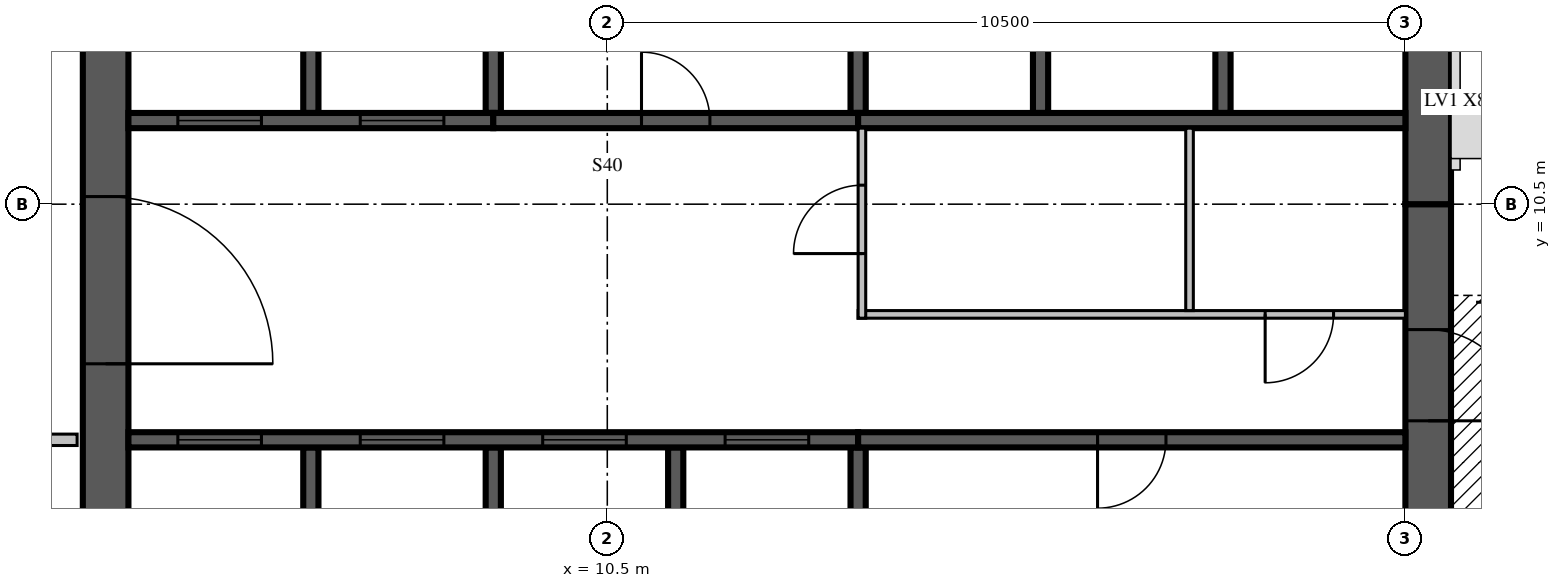
"""IFC4 building model, lengths in metres.
Left out: names, types, materials, properties, quantities, classifications, styles, units other than length and angle.
Written with IfcOpenShell. Run it as: python <this file> out.ifc"""

import sys

from ifc_helpers import new_model, si_unit, direction, frame, frame_2d, origin, place, context, subcontext, project, spatial, rectangle, extrude, source, transform, mapped, element, fill, save


model = new_model("IFC4")
c1 = context("Model", 3, precision=1e-05, world=origin(), true_north=direction((0.0, 1.0)))
c2 = subcontext(c1, "Body", "Model", "MODEL_VIEW")
j1 = project(units=[si_unit("LENGTHUNIT", "METRE"), si_unit("PLANEANGLEUNIT", "RADIAN")], contexts=[c1])
p1 = place(None, origin())
s1 = spatial("IfcSite", under=j1, at=p1, CompositionType="ELEMENT")
p2 = place(p1, origin())
s2 = spatial("IfcBuilding", under=s1, at=p2, CompositionType="ELEMENT")
p3 = place(p2, frame((0.0, 0.0, 305.5)))
s3 = spatial("IfcBuildingStorey", under=s2, at=p3, CompositionType="ELEMENT", Elevation=305.5)
m1 = source(origin(), c2, "Body", "SweptSolid", [
    extrude(rectangle(XDim=17.4, YDim=0.6, at=frame_2d((8.7, 0.0))), origin(), (0.0, 0.0, 1.0), 3.5),
])
p4 = place(p3, frame((3.9, 4.2, 0.0), z_axis=(0.0, 0.0, 1.0), x_axis=(0.0, 1.0, 0.0)))
e1 = element("IfcWall", 1, at=p4, inside=s3, PredefinedType="SHEAR", context=c2, shape_type="MappedRepresentation", body=[
    mapped(m1, transform((0.0, 0.0, 0.0), scale=1.0)),
])
m2 = source(origin(), c2, "Body", "SweptSolid", [
    extrude(rectangle(XDim=2.2, YDim=2.1, at=frame_2d((1.1, 1.05))), frame((0.0, 0.31, 0.0), z_axis=(0.0, -1.0, 0.0), x_axis=(1.0, 0.0, 0.0)), (0.0, 0.0, 1.0), 0.62),
])
p5 = place(p4, frame((4.2, 0.0, 0.0)))
e2 = element("IfcOpeningElement", 2, at=p5, cuts=e1, PredefinedType="OPENING", context=c2, shape_type="MappedRepresentation", body=[
    mapped(m2, transform((0.0, 0.0, 0.0), scale=1.0)),
])
m3 = source(origin(), c2, "Body", "SweptSolid", [
    extrude(rectangle(XDim=0.9, YDim=2.1, at=frame_2d((0.45, 1.05))), frame((0.0, 0.31, 0.0), z_axis=(0.0, -1.0, 0.0), x_axis=(1.0, 0.0, 0.0)), (0.0, 0.0, 1.0), 0.62),
])
p6 = place(p4, frame((10.95, 0.0, 0.0)))
e3 = element("IfcOpeningElement", 3, at=p6, cuts=e1, PredefinedType="OPENING", context=c2, shape_type="MappedRepresentation", body=[
    mapped(m3, transform((0.0, 0.0, 0.0), scale=1.0)),
])
m4 = source(origin(), c2, "Body", "SweptSolid", [
    extrude(rectangle(XDim=6.3, YDim=0.6, at=frame_2d((3.15, 0.0))), origin(), (0.0, 0.0, 1.0), 3.5),
])
p7 = place(p3, frame((21.3, 4.2, 0.0), z_axis=(0.0, 0.0, 1.0), x_axis=(0.0, 1.0, 0.0)))
e4 = element("IfcWall", 4, at=p7, inside=s3, PredefinedType="SHEAR", context=c2, shape_type="MappedRepresentation", body=[
    mapped(m4, transform((0.0, 0.0, 0.0), scale=1.0)),
])
m5 = source(origin(), c2, "Body", "SweptSolid", [
    extrude(rectangle(XDim=1.2, YDim=2.1, at=frame_2d((0.6, 1.05))), frame((0.0, 0.31, 0.0), z_axis=(0.0, -1.0, 0.0), x_axis=(1.0, 0.0, 0.0)), (0.0, 0.0, 1.0), 0.62),
])
p8 = place(p7, frame((3.45, 0.0, 0.0)))
e5 = element("IfcOpeningElement", 5, at=p8, cuts=e4, PredefinedType="OPENING", context=c2, shape_type="MappedRepresentation", body=[
    mapped(m5, transform((0.0, 0.0, 0.0), scale=1.0)),
])
m6 = source(origin(), c2, "Body", "SweptSolid", [
    extrude(rectangle(XDim=10.5, YDim=0.6, at=frame_2d((5.25, 0.0))), origin(), (0.0, 0.0, 1.0), 3.5),
])
p9 = place(p3, frame((21.3, 10.5, 0.0), z_axis=(0.0, 0.0, 1.0), x_axis=(0.0, 1.0, 0.0)))
e6 = element("IfcWall", 6, at=p9, inside=s3, PredefinedType="SHEAR", context=c2, shape_type="MappedRepresentation", body=[
    mapped(m6, transform((0.0, 0.0, 0.0), scale=1.0)),
])
m7 = source(origin(), c2, "Body", "SweptSolid", [
    extrude(rectangle(XDim=1.2, YDim=2.4, at=frame_2d((0.6, 1.2))), frame((0.0, 0.31, 0.0), z_axis=(0.0, -1.0, 0.0), x_axis=(1.0, 0.0, 0.0)), (0.0, 0.0, 1.0), 0.62),
])
p10 = place(p9, frame((5.7, 0.0, 0.6)))
e7 = element("IfcOpeningElement", 7, at=p10, cuts=e6, PredefinedType="OPENING", context=c2, shape_type="MappedRepresentation", body=[
    mapped(m7, transform((0.0, 0.0, 0.0), scale=1.0)),
])
m8 = source(origin(), c2, "Body", "SweptSolid", [
    extrude(rectangle(XDim=3.1, YDim=0.2, at=frame_2d((1.55, 0.0))), origin(), (0.0, 0.0, 1.0), 3.5),
])
for number, where, z_axis, x_axis in (
    (8, (6.6, 4.2, 0.0), (0.0, 0.0, 1.0), (0.0, 1.0, 0.0)),
    (9, (9.0, 4.2, 0.0), (0.0, 0.0, 1.0), (0.0, 1.0, 0.0)),
    (10, (11.4, 4.2, 0.0), (0.0, 0.0, 1.0), (0.0, 1.0, 0.0)),
):
    element("IfcWall", number, at=place(p3, frame(where, z_axis=z_axis, x_axis=x_axis)), inside=s3, PredefinedType="SOLIDWALL", context=c2, shape_type="MappedRepresentation", body=[
        mapped(m8, transform((0.0, 0.0, 0.0), scale=1.0)),
    ])
m9 = source(origin(), c2, "Body", "SweptSolid", [
    extrude(rectangle(XDim=3.1, YDim=0.2, at=frame_2d((1.55, 0.0))), origin(), (0.0, 0.0, 1.0), 3.1),
])
p11 = place(p3, frame((13.8, 4.2, 0.0), z_axis=(0.0, 0.0, 1.0), x_axis=(0.0, 1.0, 0.0)))
e11 = element("IfcWall", 11, at=p11, inside=s3, PredefinedType="SOLIDWALL", context=c2, shape_type="MappedRepresentation", body=[
    mapped(m9, transform((0.0, 0.0, 0.0), scale=1.0)),
])
m10 = source(origin(), c2, "Body", "SweptSolid", [
    extrude(rectangle(XDim=3.0, YDim=0.2, at=frame_2d((1.5, 0.0))), origin(), (0.0, 0.0, 1.0), 3.5),
])
p12 = place(p3, frame((6.6, 11.7, 0.0), z_axis=(0.0, 0.0, 1.0), x_axis=(0.0, 1.0, 0.0)))
e12 = element("IfcWall", 12, at=p12, inside=s3, PredefinedType="SOLIDWALL", context=c2, shape_type="MappedRepresentation", body=[
    mapped(m10, transform((0.0, 0.0, 0.0), scale=1.0)),
])
m11 = source(origin(), c2, "Body", "SweptSolid", [
    extrude(rectangle(XDim=3.0, YDim=0.2, at=frame_2d((1.5, 0.0))), origin(), (0.0, 0.0, 1.0), 3.1),
])
for number, where, z_axis, x_axis in (
    (13, (9.0, 11.7, 0.0), (0.0, 0.0, 1.0), (0.0, 1.0, 0.0)),
    (14, (13.8, 11.7, 0.0), (0.0, 0.0, 1.0), (0.0, 1.0, 0.0)),
):
    element("IfcWall", number, at=place(p3, frame(where, z_axis=z_axis, x_axis=x_axis)), inside=s3, PredefinedType="SOLIDWALL", context=c2, shape_type="MappedRepresentation", body=[
        mapped(m11, transform((0.0, 0.0, 0.0), scale=1.0)),
    ])
for number, where, z_axis, x_axis in (
    (15, (16.2, 11.7, 0.0), (0.0, 0.0, 1.0), (0.0, 1.0, 0.0)),
    (16, (18.6, 11.7, 0.0), (0.0, 0.0, 1.0), (0.0, 1.0, 0.0)),
):
    element("IfcWall", number, at=place(p3, frame(where, z_axis=z_axis, x_axis=x_axis)), inside=s3, PredefinedType="SOLIDWALL", context=c2, shape_type="MappedRepresentation", body=[
        mapped(m10, transform((0.0, 0.0, 0.0), scale=1.0)),
    ])
m12 = source(origin(), c2, "Body", "SweptSolid", [
    extrude(rectangle(XDim=9.6, YDim=0.2, at=frame_2d((4.8, 0.0))), origin(), (0.0, 0.0, 1.0), 3.5),
])
p13 = place(p3, frame((4.2, 7.4, 0.0), z_axis=(0.0, 0.0, 1.0), x_axis=(1.0, 0.0, 0.0)))
e17 = element("IfcWall", 17, at=p13, inside=s3, PredefinedType="SOLIDWALL", context=c2, shape_type="MappedRepresentation", body=[
    mapped(m12, transform((0.0, 0.0, 0.0), scale=1.0)),
])
m13 = source(origin(), c2, "Body", "SweptSolid", [
    extrude(rectangle(XDim=1.1, YDim=2.1, at=frame_2d((0.55, 1.05))), frame((0.0, 0.11, 0.0), z_axis=(0.0, -1.0, 0.0), x_axis=(1.0, 0.0, 0.0)), (0.0, 0.0, 1.0), 0.22),
])
p14 = place(p13, frame((0.65, 0.0, 0.0)))
e18 = element("IfcOpeningElement", 18, at=p14, cuts=e17, PredefinedType="OPENING", context=c2, shape_type="MappedRepresentation", body=[
    mapped(m13, transform((0.0, 0.0, 0.0), scale=1.0)),
])
p15 = place(p13, frame((3.05, 0.0, 0.0)))
e19 = element("IfcOpeningElement", 19, at=p15, cuts=e17, PredefinedType="OPENING", context=c2, shape_type="MappedRepresentation", body=[
    mapped(m13, transform((0.0, 0.0, 0.0), scale=1.0)),
])
p16 = place(p13, frame((5.45, 0.0, 0.0)))
e20 = element("IfcOpeningElement", 20, at=p16, cuts=e17, PredefinedType="OPENING", context=c2, shape_type="MappedRepresentation", body=[
    mapped(m13, transform((0.0, 0.0, 0.0), scale=1.0)),
])
p17 = place(p13, frame((7.85, 0.0, 0.0)))
e21 = element("IfcOpeningElement", 21, at=p17, cuts=e17, PredefinedType="OPENING", context=c2, shape_type="MappedRepresentation", body=[
    mapped(m13, transform((0.0, 0.0, 0.0), scale=1.0)),
])
m14 = source(origin(), c2, "Body", "SweptSolid", [
    extrude(rectangle(XDim=7.2, YDim=0.2, at=frame_2d((3.6, 0.0))), origin(), (0.0, 0.0, 1.0), 3.1),
])
p18 = place(p3, frame((13.8, 7.4, 0.0), z_axis=(0.0, 0.0, 1.0), x_axis=(1.0, 0.0, 0.0)))
e22 = element("IfcWall", 22, at=p18, inside=s3, PredefinedType="SOLIDWALL", context=c2, shape_type="MappedRepresentation", body=[
    mapped(m14, transform((0.0, 0.0, 0.0), scale=1.0)),
])
m15 = source(origin(), c2, "Body", "SweptSolid", [
    extrude(rectangle(XDim=0.9, YDim=2.1, at=frame_2d((0.45, 1.05))), frame((0.0, 0.11, 0.0), z_axis=(0.0, -1.0, 0.0), x_axis=(1.0, 0.0, 0.0)), (0.0, 0.0, 1.0), 0.22),
])
p19 = place(p18, frame((3.15, 0.0, 0.0)))
e23 = element("IfcOpeningElement", 23, at=p19, cuts=e22, PredefinedType="OPENING", context=c2, shape_type="MappedRepresentation", body=[
    mapped(m15, transform((0.0, 0.0, 0.0), scale=1.0)),
])
m16 = source(origin(), c2, "Body", "SweptSolid", [
    extrude(rectangle(XDim=4.8, YDim=0.2, at=frame_2d((2.4, 0.0))), origin(), (0.0, 0.0, 1.0), 3.5),
])
p20 = place(p3, frame((4.2, 11.6, 0.0), z_axis=(0.0, 0.0, 1.0), x_axis=(1.0, 0.0, 0.0)))
e24 = element("IfcWall", 24, at=p20, inside=s3, PredefinedType="SOLIDWALL", context=c2, shape_type="MappedRepresentation", body=[
    mapped(m16, transform((0.0, 0.0, 0.0), scale=1.0)),
])
p21 = place(p20, frame((0.65, 0.0, 0.0)))
e25 = element("IfcOpeningElement", 25, at=p21, cuts=e24, PredefinedType="OPENING", context=c2, shape_type="MappedRepresentation", body=[
    mapped(m13, transform((0.0, 0.0, 0.0), scale=1.0)),
])
p22 = place(p20, frame((3.05, 0.0, 0.0)))
e26 = element("IfcOpeningElement", 26, at=p22, cuts=e24, PredefinedType="OPENING", context=c2, shape_type="MappedRepresentation", body=[
    mapped(m13, transform((0.0, 0.0, 0.0), scale=1.0)),
])
m17 = source(origin(), c2, "Body", "SweptSolid", [
    extrude(rectangle(XDim=4.8, YDim=0.2, at=frame_2d((2.4, 0.0))), origin(), (0.0, 0.0, 1.0), 3.1),
])
p23 = place(p3, frame((9.0, 11.6, 0.0), z_axis=(0.0, 0.0, 1.0), x_axis=(1.0, 0.0, 0.0)))
e27 = element("IfcWall", 27, at=p23, inside=s3, PredefinedType="SOLIDWALL", context=c2, shape_type="MappedRepresentation", body=[
    mapped(m17, transform((0.0, 0.0, 0.0), scale=1.0)),
])
p24 = place(p23, frame((1.95, 0.0, 0.0)))
e28 = element("IfcOpeningElement", 28, at=p24, cuts=e27, PredefinedType="OPENING", context=c2, shape_type="MappedRepresentation", body=[
    mapped(m15, transform((0.0, 0.0, 0.0), scale=1.0)),
])
m18 = source(origin(), c2, "Body", "SweptSolid", [
    extrude(rectangle(XDim=7.2, YDim=0.2, at=frame_2d((3.6, 0.0))), origin(), (0.0, 0.0, 1.0), 3.5),
])
p25 = place(p3, frame((13.8, 11.6, 0.0), z_axis=(0.0, 0.0, 1.0), x_axis=(1.0, 0.0, 0.0)))
e29 = element("IfcWall", 29, at=p25, inside=s3, PredefinedType="SOLIDWALL", context=c2, shape_type="MappedRepresentation", body=[
    mapped(m18, transform((0.0, 0.0, 0.0), scale=1.0)),
])
m19 = source(origin(), c2, "Body", "SweptSolid", [
    extrude(rectangle(XDim=7.2, YDim=0.1, at=frame_2d((3.6, 0.0))), origin(), (0.0, 0.0, 1.0), 3.1),
])
p26 = place(p3, frame((13.8, 9.05, 0.0), z_axis=(0.0, 0.0, 1.0), x_axis=(1.0, 0.0, 0.0)))
e30 = element("IfcWall", 30, at=p26, inside=s3, PredefinedType="PARTITIONING", context=c2, shape_type="MappedRepresentation", body=[
    mapped(m19, transform((0.0, 0.0, 0.0), scale=1.0)),
])
m20 = source(origin(), c2, "Body", "SweptSolid", [
    extrude(rectangle(XDim=0.9, YDim=2.1, at=frame_2d((0.45, 1.05))), frame((0.0, 0.06, 0.0), z_axis=(0.0, -1.0, 0.0), x_axis=(1.0, 0.0, 0.0)), (0.0, 0.0, 1.0), 0.12),
])
p27 = place(p26, frame((5.355, 0.0, 0.0)))
e31 = element("IfcOpeningElement", 31, at=p27, cuts=e30, PredefinedType="OPENING", context=c2, shape_type="MappedRepresentation", body=[
    mapped(m20, transform((0.0, 0.0, 0.0), scale=1.0)),
])
m21 = source(origin(), c2, "Body", "SweptSolid", [
    extrude(rectangle(XDim=2.5, YDim=0.1, at=frame_2d((1.25, 0.0))), origin(), (0.0, 0.0, 1.0), 3.1),
])
p28 = place(p3, frame((13.85, 9.0, 0.0), z_axis=(0.0, 0.0, 1.0), x_axis=(0.0, 1.0, 0.0)))
e32 = element("IfcWall", 32, at=p28, inside=s3, PredefinedType="PARTITIONING", context=c2, shape_type="MappedRepresentation", body=[
    mapped(m21, transform((0.0, 0.0, 0.0), scale=1.0)),
])
p29 = place(p28, frame((0.85, 0.0, 0.0)))
e33 = element("IfcOpeningElement", 33, at=p29, cuts=e32, PredefinedType="OPENING", context=c2, shape_type="MappedRepresentation", body=[
    mapped(m20, transform((0.0, 0.0, 0.0), scale=1.0)),
])
m22 = source(origin(), c2, "Body", "SweptSolid", [
    extrude(rectangle(XDim=2.4, YDim=0.1, at=frame_2d((1.2, 0.0))), origin(), (0.0, 0.0, 1.0), 3.1),
])
p30 = place(p3, frame((18.16, 9.1, 0.0), z_axis=(0.0, 0.0, 1.0), x_axis=(0.0, 1.0, 0.0)))
e34 = element("IfcWall", 34, at=p30, inside=s3, PredefinedType="PARTITIONING", context=c2, shape_type="MappedRepresentation", body=[
    mapped(m22, transform((0.0, 0.0, 0.0), scale=1.0)),
])
m23 = source(origin(), c2, "Body", "SweptSolid", [
    extrude(rectangle(XDim=3.225, YDim=0.15, at=frame_2d((1.613, 0.0))), origin(), (0.0, 0.0, 1.0), 3.1),
])
p31 = place(p3, frame((0.3, 7.4, 0.0), z_axis=(0.0, 0.0, 1.0), x_axis=(1.0, 0.0, 0.0)))
e35 = element("IfcWall", 35, at=p31, inside=s3, PredefinedType="PARTITIONING", context=c2, shape_type="MappedRepresentation", body=[
    mapped(m23, transform((0.0, 0.0, 0.0), scale=1.0)),
])
m24 = source(origin(), c2, "Body", "SweptSolid", [
    extrude(rectangle(XDim=0.9, YDim=2.1, at=frame_2d((0.45, 1.05))), frame((0.0, 0.085, 0.0), z_axis=(0.0, -1.0, 0.0), x_axis=(1.0, 0.0, 0.0)), (0.0, 0.0, 1.0), 0.17),
])
p32 = place(p31, frame((1.2, 0.0, 0.0)))
e36 = element("IfcOpeningElement", 36, at=p32, cuts=e35, PredefinedType="OPENING", context=c2, shape_type="MappedRepresentation", body=[
    mapped(m24, transform((0.0, 0.0, 0.0), scale=1.0)),
])
m25 = source(origin(), c2, "Body", "SweptSolid", [
    extrude(rectangle(XDim=1.1, YDim=2.1, at=frame_2d((0.55, 1.05))), frame((0.0, 0.025, 0.0), z_axis=(0.0, -1.0, 0.0), x_axis=(1.0, 0.0, 0.0)), (0.0, 0.0, 1.0), 0.05),
])
p33 = place(p14, origin())
e37 = element("IfcDoor", 37, at=p33, inside=s3, OperationType="SLIDING_TO_LEFT", PredefinedType="DOOR", context=c2, shape_type="MappedRepresentation", body=[
    mapped(m25, transform((0.0, 0.0, 0.0), scale=1.0)),
])
fill(e18, e37)
p34 = place(p15, origin())
e38 = element("IfcDoor", 38, at=p34, inside=s3, OperationType="SLIDING_TO_LEFT", PredefinedType="DOOR", context=c2, shape_type="MappedRepresentation", body=[
    mapped(m25, transform((0.0, 0.0, 0.0), scale=1.0)),
])
fill(e19, e38)
p35 = place(p16, origin())
e39 = element("IfcDoor", 39, at=p35, inside=s3, OperationType="SLIDING_TO_LEFT", PredefinedType="DOOR", context=c2, shape_type="MappedRepresentation", body=[
    mapped(m25, transform((0.0, 0.0, 0.0), scale=1.0)),
])
fill(e20, e39)
p36 = place(p17, origin())
e40 = element("IfcDoor", 40, at=p36, inside=s3, OperationType="SLIDING_TO_LEFT", PredefinedType="DOOR", context=c2, shape_type="MappedRepresentation", body=[
    mapped(m25, transform((0.0, 0.0, 0.0), scale=1.0)),
])
fill(e21, e40)
m26 = source(origin(), c2, "Body", "SweptSolid", [
    extrude(rectangle(XDim=0.9, YDim=2.1, at=frame_2d((0.45, 1.05))), frame((0.0, 0.025, 0.0), z_axis=(0.0, -1.0, 0.0), x_axis=(1.0, 0.0, 0.0)), (0.0, 0.0, 1.0), 0.05),
])
p37 = place(p19, origin())
e41 = element("IfcDoor", 41, at=p37, inside=s3, OperationType="SINGLE_SWING_RIGHT", PredefinedType="DOOR", context=c2, shape_type="MappedRepresentation", body=[
    mapped(m26, transform((0.0, 0.0, 0.0), scale=1.0)),
])
fill(e23, e41)
p38 = place(p21, origin())
e42 = element("IfcDoor", 42, at=p38, inside=s3, OperationType="SLIDING_TO_LEFT", PredefinedType="DOOR", context=c2, shape_type="MappedRepresentation", body=[
    mapped(m25, transform((0.0, 0.0, 0.0), scale=1.0)),
])
fill(e25, e42)
p39 = place(p22, origin())
e43 = element("IfcDoor", 43, at=p39, inside=s3, OperationType="SLIDING_TO_LEFT", PredefinedType="DOOR", context=c2, shape_type="MappedRepresentation", body=[
    mapped(m25, transform((0.0, 0.0, 0.0), scale=1.0)),
])
fill(e26, e43)
p40 = place(p24, origin())
e44 = element("IfcDoor", 44, at=p40, inside=s3, OperationType="SINGLE_SWING_LEFT", PredefinedType="DOOR", context=c2, shape_type="MappedRepresentation", body=[
    mapped(m26, transform((0.0, 0.0, 0.0), scale=1.0)),
])
fill(e28, e44)
p41 = place(p27, origin())
e45 = element("IfcDoor", 45, at=p41, inside=s3, OperationType="SINGLE_SWING_RIGHT", PredefinedType="DOOR", context=c2, shape_type="MappedRepresentation", body=[
    mapped(m26, transform((0.0, 0.0, 0.0), scale=1.0)),
])
fill(e31, e45)
p42 = place(p29, origin())
e46 = element("IfcDoor", 46, at=p42, inside=s3, OperationType="SINGLE_SWING_LEFT", PredefinedType="DOOR", context=c2, shape_type="MappedRepresentation", body=[
    mapped(m26, transform((0.0, 0.0, 0.0), scale=1.0)),
])
fill(e33, e46)
m27 = source(origin(), c2, "Body", "SweptSolid", [
    extrude(rectangle(XDim=2.2, YDim=2.1, at=frame_2d((1.1, 1.05))), frame((0.0, 0.025, 0.0), z_axis=(0.0, -1.0, 0.0), x_axis=(1.0, 0.0, 0.0)), (0.0, 0.0, 1.0), 0.05),
])
p43 = place(p5, origin())
e47 = element("IfcDoor", 47, at=p43, inside=s3, OperationType="DOUBLE_DOOR_SINGLE_SWING", PredefinedType="DOOR", context=c2, shape_type="MappedRepresentation", body=[
    mapped(m27, transform((0.0, 0.0, 0.0), scale=1.0)),
])
fill(e2, e47)
m28 = source(origin(), c2, "Body", "SweptSolid", [
    extrude(rectangle(XDim=1.2, YDim=2.1, at=frame_2d((0.6, 1.05))), frame((0.0, 0.025, 0.0), z_axis=(0.0, -1.0, 0.0), x_axis=(1.0, 0.0, 0.0)), (0.0, 0.0, 1.0), 0.05),
])
p44 = place(p8, origin())
e48 = element("IfcDoor", 48, at=p44, inside=s3, OperationType="SINGLE_SWING_RIGHT", PredefinedType="DOOR", context=c2, shape_type="MappedRepresentation", body=[
    mapped(m28, transform((0.0, 0.0, 0.0), scale=1.0)),
])
fill(e5, e48)
save(model, sys.argv[1])
